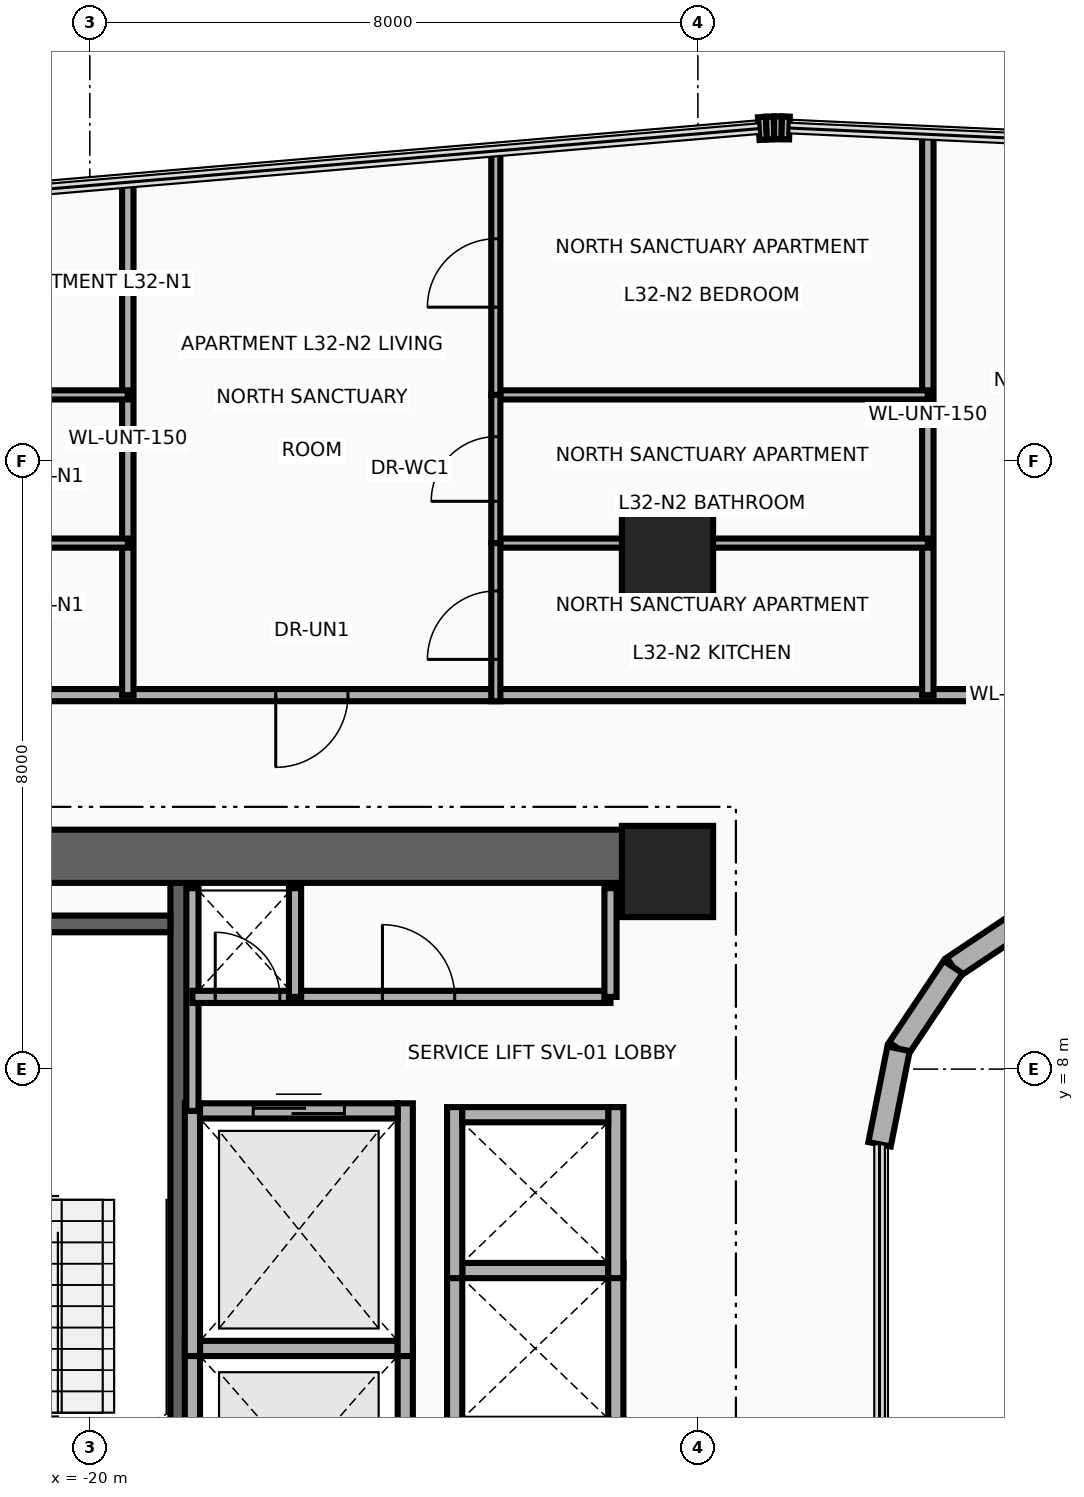
"""IFC4 building model, lengths in metres.
Left out: names, types, materials, properties, quantities, classifications, styles, units other than length and angle.
Written with IfcOpenShell. Run it as: python <this file> out.ifc"""

import sys

from ifc_helpers import new_model, si_unit, direction, frame, frame_2d, origin, origin_2d, place, context, subcontext, project, spatial, rectangle, extrude, source, transform, mapped, element, fill, save


model = new_model("IFC4")
c1 = context("Model", 3, precision=1e-05, world=origin(), true_north=direction((0.0, 1.0)))
c2 = subcontext(c1, "Body", "Model", "MODEL_VIEW")
j1 = project(units=[si_unit("LENGTHUNIT", "METRE"), si_unit("PLANEANGLEUNIT", "RADIAN")], contexts=[c1])
p1 = place(None, origin())
s1 = spatial("IfcSite", under=j1, at=p1, CompositionType="ELEMENT")
p2 = place(p1, origin())
s2 = spatial("IfcBuilding", under=s1, at=p2, CompositionType="ELEMENT")
p3 = place(p2, frame((0.0, 0.0, 127.9)))
s3 = spatial("IfcBuildingStorey", under=s2, at=p3, CompositionType="ELEMENT", Elevation=127.9)
p4 = place(p3, frame((-18.83, 1.78, 0.0), z_axis=(0.0, 0.0, 1.0), x_axis=(0.0, 1.0, 0.0)))
e1 = element("IfcWall", 1, at=p4, inside=s3, PredefinedType="SHEAR", context=c2, shape_type="SweptSolid", body=[
    extrude(rectangle(XDim=8.67, YDim=0.22, at=frame_2d((4.335, 0.0))), origin(), (0.0, 0.0, 1.0), 3.46),
])
p5 = place(p3, frame((-22.05, 9.91, 0.0), z_axis=(0.0, 0.0, 1.0), x_axis=(1.0, 0.0, 0.0)))
e2 = element("IfcWall", 2, at=p5, inside=s3, PredefinedType="SHEAR", context=c2, shape_type="SweptSolid", body=[
    extrude(rectangle(XDim=3.11, YDim=0.22, at=frame_2d((1.555, 0.0))), origin(), (0.0, 0.0, 1.0), 3.46),
])
p6 = place(p3, frame((-22.65, 10.8, 0.0), z_axis=(0.0, 0.0, 1.0), x_axis=(1.0, 0.0, 0.0)))
e3 = element("IfcWall", 3, at=p6, inside=s3, PredefinedType="SHEAR", context=c2, shape_type="SweptSolid", body=[
    extrude(rectangle(XDim=10.25, YDim=0.7, at=frame_2d((5.125, 0.0))), origin(), (0.0, 0.0, 1.0), 3.46),
])
m1 = source(origin(), c2, "Body", "SweptSolid", [
    extrude(rectangle(XDim=1.2, YDim=1.2, at=origin_2d()), origin(), (0.0, 0.0, 1.0), 3.7),
])
for number, where, z_axis, x_axis in (
    (4, (-12.4, 10.6, 0.0), (0.0, 0.0, 1.0), (1.0, 0.0, 0.0)),
    (5, (-12.4, 14.8, 0.0), (0.0, 0.0, 1.0), (1.0, 0.0, 0.0)),
):
    element("IfcColumn", number, at=place(p3, frame(where, z_axis=z_axis, x_axis=x_axis)), inside=s3, PredefinedType="COLUMN", context=c2, shape_type="MappedRepresentation", body=[
        mapped(m1, transform((0.0, 0.0, 0.0), x_axis=(1.0, 0.0, 0.0), y_axis=(0.0, 1.0, 0.0), z_axis=(0.0, 0.0, 1.0), scale=1.0)),
    ])
p7 = place(p3, frame((-11.199, 20.373, 0.0), z_axis=(0.0, 0.0, 1.0), x_axis=(0.997567332166, 0.069709524416, 0.0)))
e6 = element("IfcWall", 6, at=p7, inside=s3, PredefinedType="SOLIDWALL", context=c2, shape_type="SweptSolid", body=[
    extrude(rectangle(XDim=0.102, YDim=0.3, at=frame_2d((0.051, 0.0))), origin(), (0.0, 0.0, 1.0), 3.46),
])
p8 = place(p3, frame((-11.098, 20.38, 0.0), z_axis=(0.0, 0.0, 1.0), x_axis=(0.999334672785, 0.03647206835, 0.0)))
e7 = element("IfcWall", 7, at=p8, inside=s3, PredefinedType="SOLIDWALL", context=c2, shape_type="SweptSolid", body=[
    extrude(rectangle(XDim=0.1, YDim=0.3, at=frame_2d((0.05, 0.0))), origin(), (0.0, 0.0, 1.0), 3.46),
])
p9 = place(p3, frame((-10.998, 20.383, 0.0), z_axis=(0.0, 0.0, 1.0), x_axis=(0.999997054401, 0.002427177317, 0.0)))
e8 = element("IfcWall", 8, at=p9, inside=s3, PredefinedType="SOLIDWALL", context=c2, shape_type="SweptSolid", body=[
    extrude(rectangle(XDim=0.101, YDim=0.3, at=frame_2d((0.05, 0.0))), origin(), (0.0, 0.0, 1.0), 3.46),
])
p10 = place(p3, frame((-10.897, 20.384, 0.0), z_axis=(0.0, 0.0, 1.0), x_axis=(0.999584209171, -0.02883415988, 0.0)))
e9 = element("IfcWall", 9, at=p10, inside=s3, PredefinedType="SOLIDWALL", context=c2, shape_type="SweptSolid", body=[
    extrude(rectangle(XDim=0.102, YDim=0.3, at=frame_2d((0.051, 0.0))), origin(), (0.0, 0.0, 1.0), 3.46),
])
p11 = place(p3, frame((-7.567, 10.06, 0.0), z_axis=(0.0, 0.0, 1.0), x_axis=(-0.831497739511, -0.555528135371, 0.0)))
e10 = element("IfcWall", 10, at=p11, inside=s3, PredefinedType="SOLIDWALL", context=c2, shape_type="SweptSolid", body=[
    extrude(rectangle(XDim=1.292, YDim=0.3, at=frame_2d((0.646, 0.0))), origin(), (0.0, 0.0, 1.0), 3.46),
])
p12 = place(p3, frame((-8.642, 9.342, 0.0), z_axis=(0.0, 0.0, 1.0), x_axis=(-0.555615398575, -0.831439431869, 0.0)))
e11 = element("IfcWall", 11, at=p12, inside=s3, PredefinedType="SOLIDWALL", context=c2, shape_type="SweptSolid", body=[
    extrude(rectangle(XDim=1.292, YDim=0.3, at=frame_2d((0.646, 0.0))), origin(), (0.0, 0.0, 1.0), 3.46),
])
p13 = place(p3, frame((-9.36, 8.268, 0.0), z_axis=(0.0, 0.0, 1.0), x_axis=(-0.195090163074, -0.980785312019, 0.0)))
e12 = element("IfcWall", 12, at=p13, inside=s3, PredefinedType="SOLIDWALL", context=c2, shape_type="SweptSolid", body=[
    extrude(rectangle(XDim=1.281, YDim=0.3, at=frame_2d((0.641, 0.0))), origin(), (0.0, 0.0, 1.0), 3.46),
])
for number, where, z_axis, x_axis in (
    (13, (-18.65, 1.2, 0.0), (0.0, 0.0, 1.0), (0.0, 1.0, 0.0)),
    (14, (-15.85, 1.2, 0.0), (0.0, 0.0, 1.0), (0.0, 1.0, 0.0)),
):
    element("IfcWall", number, at=place(p3, frame(where, z_axis=z_axis, x_axis=x_axis)), inside=s3, PredefinedType="MOVABLE", context=c2, shape_type="SweptSolid", body=[
        extrude(rectangle(XDim=3.225, YDim=0.2, at=frame_2d((1.613, 0.0))), origin(), (0.0, 0.0, 1.0), 3.46),
    ])
p14 = place(p3, frame((-18.55, 4.325, 0.0), z_axis=(0.0, 0.0, 1.0), x_axis=(1.0, 0.0, 0.0)))
e15 = element("IfcWall", 15, at=p14, inside=s3, PredefinedType="MOVABLE", context=c2, shape_type="SweptSolid", body=[
    extrude(rectangle(XDim=2.6, YDim=0.2, at=frame_2d((1.3, 0.0))), origin(), (0.0, 0.0, 1.0), 3.46),
])
for number, where, z_axis, x_axis in (
    (16, (-18.65, 4.225, 0.0), (0.0, 0.0, 1.0), (0.0, 1.0, 0.0)),
    (17, (-15.85, 4.225, 0.0), (0.0, 0.0, 1.0), (0.0, 1.0, 0.0)),
):
    element("IfcWall", number, at=place(p3, frame(where, z_axis=z_axis, x_axis=x_axis)), inside=s3, PredefinedType="MOVABLE", context=c2, shape_type="SweptSolid", body=[
        extrude(rectangle(XDim=3.325, YDim=0.2, at=frame_2d((1.663, 0.0))), origin(), (0.0, 0.0, 1.0), 3.46),
    ])
p15 = place(p3, frame((-18.55, 7.45, 0.0), z_axis=(0.0, 0.0, 1.0), x_axis=(1.0, 0.0, 0.0)))
e18 = element("IfcWall", 18, at=p15, inside=s3, PredefinedType="MOVABLE", context=c2, shape_type="SweptSolid", body=[
    extrude(rectangle(XDim=2.6, YDim=0.2, at=frame_2d((1.3, 0.0))), origin(), (0.0, 0.0, 1.0), 3.46),
])
p16 = place(p15, frame((0.7, 0.0, 0.0)))
e19 = element("IfcOpeningElement", 19, at=p16, cuts=e18, PredefinedType="OPENING", context=c2, shape_type="SweptSolid", body=[
    extrude(rectangle(XDim=1.2, YDim=2.1, at=frame_2d((0.6, 1.05))), frame((0.0, 0.115, 0.0), z_axis=(0.0, -1.0, 0.0), x_axis=(1.0, 0.0, 0.0)), (0.0, 0.0, 1.0), 0.23),
])
for number, where, z_axis, x_axis in (
    (20, (-15.2, 3.2, 0.0), (0.0, 0.0, 1.0), (0.0, 1.0, 0.0)),
    (21, (-13.08, 3.2, 0.0), (0.0, 0.0, 1.0), (0.0, 1.0, 0.0)),
):
    element("IfcWall", number, at=place(p3, frame(where, z_axis=z_axis, x_axis=x_axis)), inside=s3, PredefinedType="MOVABLE", context=c2, shape_type="SweptSolid", body=[
        extrude(rectangle(XDim=2.25, YDim=0.2, at=frame_2d((1.125, 0.0))), origin(), (0.0, 0.0, 1.0), 3.46),
    ])
p17 = place(p3, frame((-15.1, 5.35, 0.0), z_axis=(0.0, 0.0, 1.0), x_axis=(1.0, 0.0, 0.0)))
e22 = element("IfcWall", 22, at=p17, inside=s3, PredefinedType="MOVABLE", context=c2, shape_type="SweptSolid", body=[
    extrude(rectangle(XDim=1.92, YDim=0.2, at=frame_2d((0.96, 0.0))), origin(), (0.0, 0.0, 1.0), 3.46),
])
for number, where, z_axis, x_axis in (
    (23, (-15.2, 5.25, 0.0), (0.0, 0.0, 1.0), (0.0, 1.0, 0.0)),
    (24, (-13.08, 5.25, 0.0), (0.0, 0.0, 1.0), (0.0, 1.0, 0.0)),
):
    element("IfcWall", number, at=place(p3, frame(where, z_axis=z_axis, x_axis=x_axis)), inside=s3, PredefinedType="MOVABLE", context=c2, shape_type="SweptSolid", body=[
        extrude(rectangle(XDim=2.25, YDim=0.2, at=frame_2d((1.125, 0.0))), origin(), (0.0, 0.0, 1.0), 3.46),
    ])
p18 = place(p3, frame((-15.1, 7.4, 0.0), z_axis=(0.0, 0.0, 1.0), x_axis=(1.0, 0.0, 0.0)))
e25 = element("IfcWall", 25, at=p18, inside=s3, PredefinedType="MOVABLE", context=c2, shape_type="SweptSolid", body=[
    extrude(rectangle(XDim=1.92, YDim=0.2, at=frame_2d((0.96, 0.0))), origin(), (0.0, 0.0, 1.0), 3.46),
])
p19 = place(p3, frame((-18.65, 7.45, 0.0), z_axis=(0.0, 0.0, 1.0), x_axis=(0.0, 1.0, 0.0)))
e26 = element("IfcWall", 26, at=p19, inside=s3, PredefinedType="PARTITIONING", context=c2, shape_type="SweptSolid", body=[
    extrude(rectangle(XDim=2.93, YDim=0.16, at=frame_2d((1.465, 0.0))), origin(), (0.0, 0.0, 1.0), 3.46),
])
p20 = place(p3, frame((-18.65, 8.95, 0.0), z_axis=(0.0, 0.0, 1.0), x_axis=(1.0, 0.0, 0.0)))
e27 = element("IfcWall", 27, at=p20, inside=s3, PredefinedType="PARTITIONING", context=c2, shape_type="SweptSolid", body=[
    extrude(rectangle(XDim=5.5, YDim=0.16, at=frame_2d((2.75, 0.0))), origin(), (0.0, 0.0, 1.0), 3.46),
])
p21 = place(p20, frame((0.3, 0.0, 0.0)))
e28 = element("IfcOpeningElement", 28, at=p21, cuts=e27, PredefinedType="OPENING", context=c2, shape_type="SweptSolid", body=[
    extrude(rectangle(XDim=0.85, YDim=2.05, at=frame_2d((0.425, 1.025))), frame((0.0, 0.095, 0.0), z_axis=(0.0, -1.0, 0.0), x_axis=(1.0, 0.0, 0.0)), (0.0, 0.0, 1.0), 0.19),
])
p22 = place(p20, frame((2.5, 0.0, 0.0)))
e29 = element("IfcOpeningElement", 29, at=p22, cuts=e27, PredefinedType="OPENING", context=c2, shape_type="SweptSolid", body=[
    extrude(rectangle(XDim=0.95, YDim=2.15, at=frame_2d((0.475, 1.075))), frame((0.0, 0.095, 0.0), z_axis=(0.0, -1.0, 0.0), x_axis=(1.0, 0.0, 0.0)), (0.0, 0.0, 1.0), 0.19),
])
for number, where, z_axis, x_axis in (
    (30, (-13.15, 8.95, 0.0), (0.0, 0.0, 1.0), (0.0, 1.0, 0.0)),
    (31, (-17.3, 8.95, 0.0), (0.0, 0.0, 1.0), (0.0, 1.0, 0.0)),
):
    element("IfcWall", number, at=place(p3, frame(where, z_axis=z_axis, x_axis=x_axis)), inside=s3, PredefinedType="PARTITIONING", context=c2, shape_type="SweptSolid", body=[
        extrude(rectangle(XDim=1.43, YDim=0.16, at=frame_2d((0.715, 0.0))), origin(), (0.0, 0.0, 1.0), 3.46),
    ])
p23 = place(p3, frame((-28.25, 12.92, 0.0), z_axis=(0.0, 0.0, 1.0), x_axis=(1.0, 0.0, 0.0)))
e32 = element("IfcWall", 32, at=p23, inside=s3, PredefinedType="PARTITIONING", context=c2, shape_type="SweptSolid", body=[
    extrude(rectangle(XDim=41.8, YDim=0.16, at=frame_2d((20.9, 0.0))), origin(), (0.0, 0.0, 1.0), 2.666),
])
p24 = place(p23, frame((0.763, 0.0, 0.0)))
e33 = element("IfcOpeningElement", 33, at=p24, cuts=e32, PredefinedType="OPENING", context=c2, shape_type="SweptSolid", body=[
    extrude(rectangle(XDim=0.95, YDim=2.15, at=frame_2d((0.475, 1.075))), frame((0.0, 0.095, 0.0), z_axis=(0.0, -1.0, 0.0), x_axis=(1.0, 0.0, 0.0)), (0.0, 0.0, 1.0), 0.19),
])
p25 = place(p23, frame((10.696, 0.0, 0.0)))
e34 = element("IfcOpeningElement", 34, at=p25, cuts=e32, PredefinedType="OPENING", context=c2, shape_type="SweptSolid", body=[
    extrude(rectangle(XDim=0.95, YDim=2.15, at=frame_2d((0.475, 1.075))), frame((0.0, 0.095, 0.0), z_axis=(0.0, -1.0, 0.0), x_axis=(1.0, 0.0, 0.0)), (0.0, 0.0, 1.0), 0.19),
])
p26 = place(p23, frame((22.215, 0.0, 0.0)))
e35 = element("IfcOpeningElement", 35, at=p26, cuts=e32, PredefinedType="OPENING", context=c2, shape_type="SweptSolid", body=[
    extrude(rectangle(XDim=0.95, YDim=2.15, at=frame_2d((0.475, 1.075))), frame((0.0, 0.095, 0.0), z_axis=(0.0, -1.0, 0.0), x_axis=(1.0, 0.0, 0.0)), (0.0, 0.0, 1.0), 0.19),
])
p27 = place(p23, frame((32.652, 0.0, 0.0)))
e36 = element("IfcOpeningElement", 36, at=p27, cuts=e32, PredefinedType="OPENING", context=c2, shape_type="SweptSolid", body=[
    extrude(rectangle(XDim=0.95, YDim=2.15, at=frame_2d((0.475, 1.075))), frame((0.0, 0.095, 0.0), z_axis=(0.0, -1.0, 0.0), x_axis=(1.0, 0.0, 0.0)), (0.0, 0.0, 1.0), 0.19),
])
p28 = place(p3, frame((-19.5, 12.92, 0.0), z_axis=(0.0, 0.0, 1.0), x_axis=(0.0, 1.0, 0.0)))
e37 = element("IfcWall", 37, at=p28, inside=s3, PredefinedType="PARTITIONING", context=c2, shape_type="SweptSolid", body=[
    extrude(rectangle(XDim=6.747, YDim=0.15, at=frame_2d((3.374, 0.0))), origin(), (0.0, 0.0, 1.0), 2.666),
])
p29 = place(p3, frame((-8.975, 12.92, 0.0), z_axis=(0.0, 0.0, 1.0), x_axis=(0.0, 1.0, 0.0)))
e38 = element("IfcWall", 38, at=p29, inside=s3, PredefinedType="PARTITIONING", context=c2, shape_type="SweptSolid", body=[
    extrude(rectangle(XDim=7.378, YDim=0.15, at=frame_2d((3.689, 0.0))), origin(), (0.0, 0.0, 1.0), 2.666),
])
p30 = place(p3, frame((-25.775, 14.92, 0.0), z_axis=(0.0, 0.0, 1.0), x_axis=(1.0, 0.0, 0.0)))
e39 = element("IfcWall", 39, at=p30, inside=s3, PredefinedType="PARTITIONING", context=c2, shape_type="SweptSolid", body=[
    extrude(rectangle(XDim=6.275, YDim=0.12, at=frame_2d((3.137, 0.0))), origin(), (0.0, 0.0, 1.0), 2.666),
])
p31 = place(p3, frame((-25.775, 16.87, 0.0), z_axis=(0.0, 0.0, 1.0), x_axis=(1.0, 0.0, 0.0)))
e40 = element("IfcWall", 40, at=p31, inside=s3, PredefinedType="PARTITIONING", context=c2, shape_type="SweptSolid", body=[
    extrude(rectangle(XDim=6.275, YDim=0.12, at=frame_2d((3.137, 0.0))), origin(), (0.0, 0.0, 1.0), 3.46),
])
p32 = place(p3, frame((-14.658, 14.92, 0.0), z_axis=(0.0, 0.0, 1.0), x_axis=(1.0, 0.0, 0.0)))
e41 = element("IfcWall", 41, at=p32, inside=s3, PredefinedType="PARTITIONING", context=c2, shape_type="SweptSolid", body=[
    extrude(rectangle(XDim=5.683, YDim=0.12, at=frame_2d((2.842, 0.0))), origin(), (0.0, 0.0, 1.0), 2.666),
])
p33 = place(p3, frame((-14.658, 16.87, 0.0), z_axis=(0.0, 0.0, 1.0), x_axis=(1.0, 0.0, 0.0)))
e42 = element("IfcWall", 42, at=p33, inside=s3, PredefinedType="PARTITIONING", context=c2, shape_type="SweptSolid", body=[
    extrude(rectangle(XDim=5.683, YDim=0.12, at=frame_2d((2.842, 0.0))), origin(), (0.0, 0.0, 1.0), 3.46),
])
p34 = place(p3, frame((-14.658, 14.92, 0.0), z_axis=(0.0, 0.0, 1.0), x_axis=(0.0, 1.0, 0.0)))
e43 = element("IfcWall", 43, at=p34, inside=s3, PredefinedType="PARTITIONING", context=c2, shape_type="SweptSolid", body=[
    extrude(rectangle(XDim=1.95, YDim=0.12, at=frame_2d((0.975, 0.0))), origin(), (0.0, 0.0, 1.0), 2.666),
])
p35 = place(p34, frame((0.55, 0.0, 0.0)))
e44 = element("IfcOpeningElement", 44, at=p35, cuts=e43, PredefinedType="OPENING", context=c2, shape_type="SweptSolid", body=[
    extrude(rectangle(XDim=0.85, YDim=2.1, at=frame_2d((0.425, 1.05))), frame((0.0, 0.075, 0.0), z_axis=(0.0, -1.0, 0.0), x_axis=(1.0, 0.0, 0.0)), (0.0, 0.0, 1.0), 0.15),
])
p36 = place(p3, frame((-14.658, 12.84, 0.0), z_axis=(0.0, 0.0, 1.0), x_axis=(0.0, 1.0, 0.0)))
e45 = element("IfcWall", 45, at=p36, inside=s3, PredefinedType="PARTITIONING", context=c2, shape_type="SweptSolid", body=[
    extrude(rectangle(XDim=2.08, YDim=0.12, at=frame_2d((1.04, 0.0))), origin(), (0.0, 0.0, 1.0), 2.666),
])
p37 = place(p36, frame((0.55, 0.0, 0.0)))
e46 = element("IfcOpeningElement", 46, at=p37, cuts=e45, PredefinedType="OPENING", context=c2, shape_type="SweptSolid", body=[
    extrude(rectangle(XDim=0.9, YDim=2.1, at=frame_2d((0.45, 1.05))), frame((0.0, 0.075, 0.0), z_axis=(0.0, -1.0, 0.0), x_axis=(1.0, 0.0, 0.0)), (0.0, 0.0, 1.0), 0.15),
])
p38 = place(p3, frame((-14.658, 16.87, 0.0), z_axis=(0.0, 0.0, 1.0), x_axis=(0.0, 1.0, 0.0)))
e47 = element("IfcWall", 47, at=p38, inside=s3, PredefinedType="PARTITIONING", context=c2, shape_type="SweptSolid", body=[
    extrude(rectangle(XDim=3.208, YDim=0.12, at=frame_2d((1.604, 0.0))), origin(), (0.0, 0.0, 1.0), 3.46),
])
p39 = place(p38, frame((1.154, 0.0, 0.0)))
e48 = element("IfcOpeningElement", 48, at=p39, cuts=e47, PredefinedType="OPENING", context=c2, shape_type="SweptSolid", body=[
    extrude(rectangle(XDim=0.9, YDim=2.1, at=frame_2d((0.45, 1.05))), frame((0.0, 0.075, 0.0), z_axis=(0.0, -1.0, 0.0), x_axis=(1.0, 0.0, 0.0)), (0.0, 0.0, 1.0), 0.15),
])
p40 = place(p16, origin())
e49 = element("IfcDoor", 49, at=p40, inside=s3, OperationType="DOUBLE_DOOR_SLIDING", PredefinedType="DOOR", context=c2, shape_type="SweptSolid", body=[
    extrude(rectangle(XDim=1.2, YDim=2.1, at=frame_2d((0.6, 1.05))), frame((0.0, 0.025, 0.0), z_axis=(0.0, -1.0, 0.0), x_axis=(1.0, 0.0, 0.0)), (0.0, 0.0, 1.0), 0.05),
])
fill(e19, e49)
p41 = place(p21, origin())
e50 = element("IfcDoor", 50, at=p41, inside=s3, OperationType="SINGLE_SWING_LEFT", PredefinedType="DOOR", context=c2, shape_type="SweptSolid", body=[
    extrude(rectangle(XDim=0.85, YDim=2.05, at=frame_2d((0.425, 1.025))), frame((0.0, 0.025, 0.0), z_axis=(0.0, -1.0, 0.0), x_axis=(1.0, 0.0, 0.0)), (0.0, 0.0, 1.0), 0.05),
])
fill(e28, e50)
p42 = place(p22, origin())
e51 = element("IfcDoor", 51, at=p42, inside=s3, OperationType="SINGLE_SWING_RIGHT", PredefinedType="DOOR", context=c2, shape_type="SweptSolid", body=[
    extrude(rectangle(XDim=0.95, YDim=2.15, at=frame_2d((0.475, 1.075))), frame((0.0, 0.025, 0.0), z_axis=(0.0, -1.0, 0.0), x_axis=(1.0, 0.0, 0.0)), (0.0, 0.0, 1.0), 0.05),
])
fill(e29, e51)
p43 = place(p25, frame((0.95, 0.0, 0.0), z_axis=(0.0, 0.0, 1.0), x_axis=(-1.0, 0.0, 0.0)))
e52 = element("IfcDoor", 52, at=p43, inside=s3, OperationType="SINGLE_SWING_LEFT", PredefinedType="DOOR", context=c2, shape_type="SweptSolid", body=[
    extrude(rectangle(XDim=0.95, YDim=2.15, at=frame_2d((0.475, 1.075))), frame((0.0, 0.025, 0.0), z_axis=(0.0, -1.0, 0.0), x_axis=(1.0, 0.0, 0.0)), (0.0, 0.0, 1.0), 0.05),
])
fill(e34, e52)
p44 = place(p35, origin())
e53 = element("IfcDoor", 53, at=p44, inside=s3, OperationType="SINGLE_SWING_RIGHT", PredefinedType="DOOR", context=c2, shape_type="SweptSolid", body=[
    extrude(rectangle(XDim=0.85, YDim=2.1, at=frame_2d((0.425, 1.05))), frame((0.0, 0.025, 0.0), z_axis=(0.0, -1.0, 0.0), x_axis=(1.0, 0.0, 0.0)), (0.0, 0.0, 1.0), 0.05),
])
fill(e44, e53)
p45 = place(p37, origin())
e54 = element("IfcDoor", 54, at=p45, inside=s3, OperationType="SINGLE_SWING_LEFT", PredefinedType="DOOR", context=c2, shape_type="SweptSolid", body=[
    extrude(rectangle(XDim=0.9, YDim=2.1, at=frame_2d((0.45, 1.05))), frame((0.0, 0.025, 0.0), z_axis=(0.0, -1.0, 0.0), x_axis=(1.0, 0.0, 0.0)), (0.0, 0.0, 1.0), 0.05),
])
fill(e46, e54)
p46 = place(p39, origin())
e55 = element("IfcDoor", 55, at=p46, inside=s3, OperationType="SINGLE_SWING_RIGHT", PredefinedType="DOOR", context=c2, shape_type="SweptSolid", body=[
    extrude(rectangle(XDim=0.9, YDim=2.1, at=frame_2d((0.45, 1.05))), frame((0.0, 0.025, 0.0), z_axis=(0.0, -1.0, 0.0), x_axis=(1.0, 0.0, 0.0)), (0.0, 0.0, 1.0), 0.05),
])
fill(e48, e55)
save(model, sys.argv[1])
